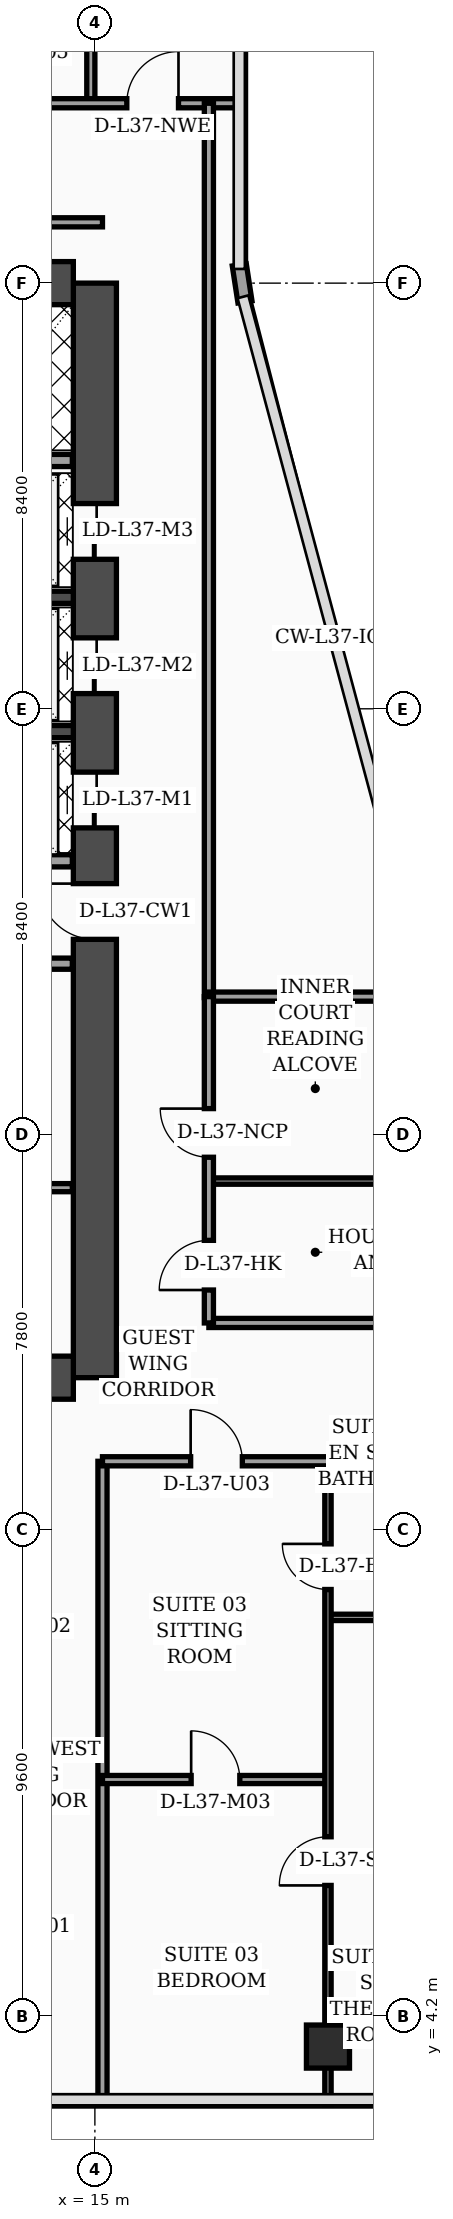
"""IFC4 building model, lengths in metres.
Left out: names, types, materials, properties, quantities, classifications, styles, units other than length and angle.
Written with IfcOpenShell. Run it as: python <this file> out.ifc"""

import sys

from ifc_helpers import new_model, si_unit, direction, frame, frame_2d, origin, origin_2d, place, context, subcontext, project, spatial, rectangle, hollow_rectangle, extrude, element, fill, save


model = new_model("IFC4")
c1 = context("Model", 3, precision=1e-05, world=origin(), true_north=direction((0.0, 1.0)))
c2 = subcontext(c1, "Body", "Model", "MODEL_VIEW")
j1 = project(units=[si_unit("LENGTHUNIT", "METRE"), si_unit("PLANEANGLEUNIT", "RADIAN")], contexts=[c1])
p1 = place(None, origin())
s1 = spatial("IfcSite", under=j1, at=p1, CompositionType="ELEMENT")
p2 = place(p1, origin())
s2 = spatial("IfcBuilding", under=s1, at=p2, CompositionType="ELEMENT")
p3 = place(p2, frame((0.0, 0.0, 152.3)))
s3 = spatial("IfcBuildingStorey", under=s2, at=p3, CompositionType="ELEMENT", Elevation=152.3)
p4 = place(p3, frame((15.0, 16.8, 0.0), z_axis=(0.0, 0.0, 1.0), x_axis=(0.0, 1.0, 0.0)))
e1 = element("IfcWall", 1, at=p4, inside=s3, PredefinedType="SHEAR", context=c2, shape_type="SweptSolid", body=[
    extrude(rectangle(XDim=21.6, YDim=0.85, at=frame_2d((10.8, 0.0))), origin(), (0.0, 0.0, 1.0), 3.56),
])
p5 = place(p4, frame((8.65, 0.0, 0.0)))
e2 = element("IfcOpeningElement", 2, at=p5, cuts=e1, PredefinedType="OPENING", context=c2, shape_type="SweptSolid", body=[
    extrude(rectangle(XDim=1.1, YDim=2.2, at=frame_2d((0.55, 1.1))), frame((0.0, 0.435, 0.0), z_axis=(0.0, -1.0, 0.0), x_axis=(1.0, 0.0, 0.0)), (0.0, 0.0, 1.0), 0.87),
])
p6 = place(p4, frame((10.85, 0.0, 0.0)))
e3 = element("IfcOpeningElement", 3, at=p6, cuts=e1, PredefinedType="OPENING", context=c2, shape_type="SweptSolid", body=[
    extrude(rectangle(XDim=1.1, YDim=2.2, at=frame_2d((0.55, 1.1))), frame((0.0, 0.435, 0.0), z_axis=(0.0, -1.0, 0.0), x_axis=(1.0, 0.0, 0.0)), (0.0, 0.0, 1.0), 0.87),
])
p7 = place(p4, frame((13.5, 0.0, 0.0)))
e4 = element("IfcOpeningElement", 4, at=p7, cuts=e1, PredefinedType="OPENING", context=c2, shape_type="SweptSolid", body=[
    extrude(rectangle(XDim=1.1, YDim=2.2, at=frame_2d((0.55, 1.1))), frame((0.0, 0.435, 0.0), z_axis=(0.0, -1.0, 0.0), x_axis=(1.0, 0.0, 0.0)), (0.0, 0.0, 1.0), 0.87),
])
p8 = place(p4, frame((16.15, 0.0, 0.0)))
e5 = element("IfcOpeningElement", 5, at=p8, cuts=e1, PredefinedType="OPENING", context=c2, shape_type="SweptSolid", body=[
    extrude(rectangle(XDim=1.1, YDim=2.2, at=frame_2d((0.55, 1.1))), frame((0.0, 0.435, 0.0), z_axis=(0.0, -1.0, 0.0), x_axis=(1.0, 0.0, 0.0)), (0.0, 0.0, 1.0), 0.87),
])
for number, where, z_axis, x_axis in (
    (6, (4.625, 38.4, 0.0), (0.0, 0.0, 1.0), (1.0, 0.0, 0.0)),
    (7, (4.625, 16.8, 0.0), (0.0, 0.0, 1.0), (1.0, 0.0, 0.0)),
):
    element("IfcWall", number, at=place(p3, frame(where, z_axis=z_axis, x_axis=x_axis)), inside=s3, PredefinedType="SHEAR", context=c2, shape_type="SweptSolid", body=[
        extrude(rectangle(XDim=9.95, YDim=0.85, at=frame_2d((4.975, 0.0))), origin(), (0.0, 0.0, 1.0), 3.56),
    ])
for number, where, z_axis, x_axis in (
    (8, (12.18, 29.55, 0.0), (0.0, 0.0, 1.0), (1.0, 0.0, 0.0)),
    (9, (12.18, 32.2, 0.0), (0.0, 0.0, 1.0), (1.0, 0.0, 0.0)),
):
    element("IfcWall", number, at=place(p3, frame(where, z_axis=z_axis, x_axis=x_axis)), inside=s3, PredefinedType="SOLIDWALL", context=c2, shape_type="SweptSolid", body=[
        extrude(rectangle(XDim=2.395, YDim=0.24, at=frame_2d((1.198, 0.0))), origin(), (0.0, 0.0, 1.0), 3.56),
    ])
p9 = place(p3, frame((19.6, 3.6, 0.0), z_axis=(0.0, 0.0, 1.0), x_axis=(1.0, 0.0, 0.0)))
e10 = element("IfcColumn", 10, at=p9, inside=s3, PredefinedType="COLUMN", context=c2, shape_type="SweptSolid", body=[
    extrude(hollow_rectangle(XDim=0.85, YDim=0.85, WallThickness=0.036, at=origin_2d()), origin(), (0.0, 0.0, 1.0), 3.56),
])
p10 = place(p3, frame((17.962, 38.03, 0.0), z_axis=(0.0, 0.0, 1.0), x_axis=(-0.15141125477, 0.988470855377, 0.0)))
e11 = element("IfcWall", 11, at=p10, inside=s3, PredefinedType="SOLIDWALL", context=c2, shape_type="SweptSolid", body=[
    extrude(rectangle(XDim=0.739, YDim=0.28, at=frame_2d((0.369, 0.0))), origin(), (0.0, 0.0, 1.0), 3.56),
])
p11 = place(p3, frame((9.68, 20.55, 0.0), z_axis=(0.0, 0.0, 1.0), x_axis=(1.0, 0.0, 0.0)))
e12 = element("IfcWall", 12, at=p11, inside=s3, PredefinedType="PARTITIONING", context=c2, shape_type="SweptSolid", body=[
    extrude(rectangle(XDim=4.875, YDim=0.16, at=frame_2d((2.438, 0.0))), origin(), (0.0, 0.0, 1.0), 3.56),
])
p12 = place(p11, frame((1.1, 0.0, 0.0)))
e13 = element("IfcOpeningElement", 13, at=p12, cuts=e12, PredefinedType="OPENING", context=c2, shape_type="SweptSolid", body=[
    extrude(rectangle(XDim=0.98, YDim=2.15, at=frame_2d((0.49, 1.075))), frame((0.0, 0.09, 0.0), z_axis=(0.0, -1.0, 0.0), x_axis=(1.0, 0.0, 0.0)), (0.0, 0.0, 1.0), 0.18),
])
p13 = place(p3, frame((9.68, 24.97, 0.0), z_axis=(0.0, 0.0, 1.0), x_axis=(1.0, 0.0, 0.0)))
e14 = element("IfcWall", 14, at=p13, inside=s3, PredefinedType="SOLIDWALL", context=c2, shape_type="SweptSolid", body=[
    extrude(rectangle(XDim=4.875, YDim=0.22, at=frame_2d((2.438, 0.0))), origin(), (0.0, 0.0, 1.0), 2.94),
])
p14 = place(p13, frame((0.9, 0.0, 0.0)))
e15 = element("IfcOpeningElement", 15, at=p14, cuts=e14, PredefinedType="OPENING", context=c2, shape_type="SweptSolid", body=[
    extrude(rectangle(XDim=0.98, YDim=2.15, at=frame_2d((0.49, 1.075))), frame((0.0, 0.12, 0.0), z_axis=(0.0, -1.0, 0.0), x_axis=(1.0, 0.0, 0.0)), (0.0, 0.0, 1.0), 0.24),
])
p15 = place(p3, frame((12.25, 27.0, 0.0), z_axis=(0.0, 0.0, 1.0), x_axis=(1.0, 0.0, 0.0)))
e16 = element("IfcWall", 16, at=p15, inside=s3, PredefinedType="SOLIDWALL", context=c2, shape_type="SweptSolid", body=[
    extrude(rectangle(XDim=2.305, YDim=0.24, at=frame_2d((1.152, 0.0))), origin(), (0.0, 0.0, 1.0), 3.56),
])
p16 = place(p3, frame((9.66, 34.9, 0.0), z_axis=(0.0, 0.0, 1.0), x_axis=(1.0, 0.0, 0.0)))
e17 = element("IfcWall", 17, at=p16, inside=s3, PredefinedType="SOLIDWALL", context=c2, shape_type="SweptSolid", body=[
    extrude(rectangle(XDim=4.895, YDim=0.24, at=frame_2d((2.448, 0.0))), origin(), (0.0, 0.0, 1.0), 3.56),
])
p17 = place(p3, frame((15.15, 2.44, 0.0), z_axis=(0.0, 0.0, 1.0), x_axis=(0.0, 1.0, 0.0)))
e18 = element("IfcWall", 18, at=p17, inside=s3, PredefinedType="PARTITIONING", context=c2, shape_type="SweptSolid", body=[
    extrude(rectangle(XDim=12.71, YDim=0.18, at=frame_2d((6.355, 0.0))), origin(), (0.0, 0.0, 1.0), 3.04),
])
p18 = place(p3, frame((19.6, 12.07, 0.0), z_axis=(0.0, 0.0, 1.0), x_axis=(1.0, 0.0, 0.0)))
e19 = element("IfcWall", 19, at=p18, inside=s3, PredefinedType="PARTITIONING", context=c2, shape_type="SweptSolid", body=[
    extrude(rectangle(XDim=2.0, YDim=0.125, at=frame_2d((1.0, 0.0))), origin(), (0.0, 0.0, 1.0), 3.56),
])
p19 = place(p3, frame((15.15, 8.87, 0.0), z_axis=(0.0, 0.0, 1.0), x_axis=(1.0, 0.0, 0.0)))
e20 = element("IfcWall", 20, at=p19, inside=s3, PredefinedType="PARTITIONING", context=c2, shape_type="SweptSolid", body=[
    extrude(rectangle(XDim=4.45, YDim=0.16, at=frame_2d((2.225, 0.0))), origin(), (0.0, 0.0, 1.0), 3.56),
])
p20 = place(p19, frame((1.75, 0.0, 0.0)))
e21 = element("IfcOpeningElement", 21, at=p20, cuts=e20, PredefinedType="OPENING", context=c2, shape_type="SweptSolid", body=[
    extrude(rectangle(XDim=0.96, YDim=2.2, at=frame_2d((0.48, 1.1))), frame((0.0, 0.09, 0.0), z_axis=(0.0, -1.0, 0.0), x_axis=(1.0, 0.0, 0.0)), (0.0, 0.0, 1.0), 0.18),
])
p21 = place(p3, frame((19.6, 2.44, 0.0), z_axis=(0.0, 0.0, 1.0), x_axis=(0.0, 1.0, 0.0)))
e22 = element("IfcWall", 22, at=p21, inside=s3, PredefinedType="PARTITIONING", context=c2, shape_type="SweptSolid", body=[
    extrude(rectangle(XDim=12.71, YDim=0.125, at=frame_2d((6.355, 0.0))), origin(), (0.0, 0.0, 1.0), 2.49),
])
p22 = place(p21, frame((4.34, 0.0, 0.0)))
e23 = element("IfcOpeningElement", 23, at=p22, cuts=e22, PredefinedType="OPENING", context=c2, shape_type="SweptSolid", body=[
    extrude(rectangle(XDim=0.96, YDim=2.2, at=frame_2d((0.48, 1.1))), frame((0.0, 0.073, 0.0), z_axis=(0.0, -1.0, 0.0), x_axis=(1.0, 0.0, 0.0)), (0.0, 0.0, 1.0), 0.145),
])
p23 = place(p21, frame((10.18, 0.0, 0.0)))
e24 = element("IfcOpeningElement", 24, at=p23, cuts=e22, PredefinedType="OPENING", context=c2, shape_type="SweptSolid", body=[
    extrude(rectangle(XDim=0.9, YDim=2.15, at=frame_2d((0.45, 1.075))), frame((0.0, 0.073, 0.0), z_axis=(0.0, -1.0, 0.0), x_axis=(1.0, 0.0, 0.0)), (0.0, 0.0, 1.0), 0.145),
])
p24 = place(p3, frame((15.15, 15.15, 0.0), z_axis=(0.0, 0.0, 1.0), x_axis=(1.0, 0.0, 0.0)))
e25 = element("IfcWall", 25, at=p24, inside=s3, PredefinedType="PARTITIONING", context=c2, shape_type="SweptSolid", body=[
    extrude(rectangle(XDim=6.45, YDim=0.18, at=frame_2d((3.225, 0.0))), origin(), (0.0, 0.0, 1.0), 2.49),
])
p25 = place(p24, frame((1.74, 0.0, 0.0)))
e26 = element("IfcOpeningElement", 26, at=p25, cuts=e25, PredefinedType="OPENING", context=c2, shape_type="SweptSolid", body=[
    extrude(rectangle(XDim=1.02, YDim=2.2, at=frame_2d((0.51, 1.1))), frame((0.0, 0.1, 0.0), z_axis=(0.0, -1.0, 0.0), x_axis=(1.0, 0.0, 0.0)), (0.0, 0.0, 1.0), 0.2),
])
p26 = place(p3, frame((14.92, 41.95, 0.0), z_axis=(0.0, 0.0, 1.0), x_axis=(0.0, 1.0, 0.0)))
e27 = element("IfcWall", 27, at=p26, inside=s3, PredefinedType="PARTITIONING", context=c2, shape_type="SweptSolid", body=[
    extrude(rectangle(XDim=5.85, YDim=0.16, at=frame_2d((2.925, 0.0))), origin(), (0.0, 0.0, 1.0), 3.04),
])
p27 = place(p3, frame((0.08, 41.95, 0.0), z_axis=(0.0, 0.0, 1.0), x_axis=(1.0, 0.0, 0.0)))
e28 = element("IfcWall", 28, at=p27, inside=s3, PredefinedType="PARTITIONING", context=c2, shape_type="SweptSolid", body=[
    extrude(rectangle(XDim=17.77, YDim=0.18, at=frame_2d((8.885, 0.0))), origin(), (0.0, 0.0, 1.0), 2.94),
])
p28 = place(p27, frame((0.9, 0.0, 0.0)))
e29 = element("IfcOpeningElement", 29, at=p28, cuts=e28, PredefinedType="OPENING", context=c2, shape_type="SweptSolid", body=[
    extrude(rectangle(XDim=1.02, YDim=2.2, at=frame_2d((0.51, 1.1))), frame((0.0, 0.1, 0.0), z_axis=(0.0, -1.0, 0.0), x_axis=(1.0, 0.0, 0.0)), (0.0, 0.0, 1.0), 0.2),
])
p29 = place(p27, frame((4.45, 0.0, 0.0)))
e30 = element("IfcOpeningElement", 30, at=p29, cuts=e28, PredefinedType="OPENING", context=c2, shape_type="SweptSolid", body=[
    extrude(rectangle(XDim=1.02, YDim=2.2, at=frame_2d((0.51, 1.1))), frame((0.0, 0.1, 0.0), z_axis=(0.0, -1.0, 0.0), x_axis=(1.0, 0.0, 0.0)), (0.0, 0.0, 1.0), 0.2),
])
p30 = place(p27, frame((10.33, 0.0, 0.0)))
e31 = element("IfcOpeningElement", 31, at=p30, cuts=e28, PredefinedType="OPENING", context=c2, shape_type="SweptSolid", body=[
    extrude(rectangle(XDim=1.02, YDim=2.2, at=frame_2d((0.51, 1.1))), frame((0.0, 0.1, 0.0), z_axis=(0.0, -1.0, 0.0), x_axis=(1.0, 0.0, 0.0)), (0.0, 0.0, 1.0), 0.2),
])
p31 = place(p27, frame((15.55, 0.0, 0.0)))
e32 = element("IfcOpeningElement", 32, at=p31, cuts=e28, PredefinedType="OPENING", context=c2, shape_type="SweptSolid", body=[
    extrude(rectangle(XDim=1.02, YDim=2.2, at=frame_2d((0.51, 1.1))), frame((0.0, 0.1, 0.0), z_axis=(0.0, -1.0, 0.0), x_axis=(1.0, 0.0, 0.0)), (0.0, 0.0, 1.0), 0.2),
])
p32 = place(p3, frame((17.25, 24.3, 0.0), z_axis=(0.0, 0.0, 1.0), x_axis=(0.0, 1.0, 0.0)))
e33 = element("IfcWall", 33, at=p32, inside=s3, PredefinedType="PARTITIONING", context=c2, shape_type="SweptSolid", body=[
    extrude(rectangle(XDim=17.65, YDim=0.18, at=frame_2d((8.825, 0.0))), origin(), (0.0, 0.0, 1.0), 2.94),
])
p33 = place(p3, frame((3.755, 39.6, 0.0), z_axis=(0.0, 0.0, 1.0), x_axis=(1.0, 0.0, 0.0)))
e34 = element("IfcWall", 34, at=p33, inside=s3, PredefinedType="PARTITIONING", context=c2, shape_type="SweptSolid", body=[
    extrude(rectangle(XDim=11.395, YDim=0.18, at=frame_2d((5.698, 0.0))), origin(), (0.0, 0.0, 1.0), 2.94),
])
p34 = place(p3, frame((17.25, 17.88, 0.0), z_axis=(0.0, 0.0, 1.0), x_axis=(1.0, 0.0, 0.0)))
e35 = element("IfcWall", 35, at=p34, inside=s3, PredefinedType="PARTITIONING", context=c2, shape_type="SweptSolid", body=[
    extrude(rectangle(XDim=4.3, YDim=0.18, at=frame_2d((2.15, 0.0))), origin(), (0.0, 0.0, 1.0), 3.09),
])
p35 = place(p3, frame((17.25, 20.68, 0.0), z_axis=(0.0, 0.0, 1.0), x_axis=(1.0, 0.0, 0.0)))
e36 = element("IfcWall", 36, at=p35, inside=s3, PredefinedType="PARTITIONING", context=c2, shape_type="SweptSolid", body=[
    extrude(rectangle(XDim=4.3, YDim=0.125, at=frame_2d((2.15, 0.0))), origin(), (0.0, 0.0, 1.0), 3.56),
])
p36 = place(p3, frame((17.25, 24.32, 0.0), z_axis=(0.0, 0.0, 1.0), x_axis=(1.0, 0.0, 0.0)))
e37 = element("IfcWall", 37, at=p36, inside=s3, PredefinedType="PARTITIONING", context=c2, shape_type="SweptSolid", body=[
    extrude(rectangle(XDim=4.35, YDim=0.18, at=frame_2d((2.175, 0.0))), origin(), (0.0, 0.0, 1.0), 3.56),
])
p37 = place(p3, frame((17.25, 17.88, 0.0), z_axis=(0.0, 0.0, 1.0), x_axis=(0.0, 1.0, 0.0)))
e38 = element("IfcWall", 38, at=p37, inside=s3, PredefinedType="PARTITIONING", context=c2, shape_type="SweptSolid", body=[
    extrude(rectangle(XDim=6.44, YDim=0.18, at=frame_2d((3.22, 0.0))), origin(), (0.0, 0.0, 1.0), 3.09),
])
p38 = place(p37, frame((0.65, 0.0, 0.0)))
e39 = element("IfcOpeningElement", 39, at=p38, cuts=e38, PredefinedType="OPENING", context=c2, shape_type="SweptSolid", body=[
    extrude(rectangle(XDim=0.98, YDim=2.15, at=frame_2d((0.49, 1.075))), frame((0.0, 0.1, 0.0), z_axis=(0.0, -1.0, 0.0), x_axis=(1.0, 0.0, 0.0)), (0.0, 0.0, 1.0), 0.2),
])
p39 = place(p37, frame((3.27, 0.0, 0.0)))
e40 = element("IfcOpeningElement", 40, at=p39, cuts=e38, PredefinedType="OPENING", context=c2, shape_type="SweptSolid", body=[
    extrude(rectangle(XDim=0.96, YDim=2.2, at=frame_2d((0.48, 1.1))), frame((0.0, 0.1, 0.0), z_axis=(0.0, -1.0, 0.0), x_axis=(1.0, 0.0, 0.0)), (0.0, 0.0, 1.0), 0.2),
])
p40 = place(p20, origin())
e41 = element("IfcDoor", 41, at=p40, inside=s3, OperationType="SINGLE_SWING_LEFT", PredefinedType="DOOR", context=c2, shape_type="SweptSolid", body=[
    extrude(rectangle(XDim=0.96, YDim=2.2, at=frame_2d((0.48, 1.1))), frame((0.0, 0.025, 0.0), z_axis=(0.0, -1.0, 0.0), x_axis=(1.0, 0.0, 0.0)), (0.0, 0.0, 1.0), 0.05),
])
fill(e21, e41)
p41 = place(p22, origin())
e42 = element("IfcDoor", 42, at=p41, inside=s3, OperationType="SINGLE_SWING_LEFT", PredefinedType="DOOR", context=c2, shape_type="SweptSolid", body=[
    extrude(rectangle(XDim=0.96, YDim=2.2, at=frame_2d((0.48, 1.1))), frame((0.0, 0.025, 0.0), z_axis=(0.0, -1.0, 0.0), x_axis=(1.0, 0.0, 0.0)), (0.0, 0.0, 1.0), 0.05),
])
fill(e23, e42)
p42 = place(p23, origin())
e43 = element("IfcDoor", 43, at=p42, inside=s3, OperationType="SINGLE_SWING_RIGHT", PredefinedType="DOOR", context=c2, shape_type="SweptSolid", body=[
    extrude(rectangle(XDim=0.9, YDim=2.15, at=frame_2d((0.45, 1.075))), frame((0.0, 0.025, 0.0), z_axis=(0.0, -1.0, 0.0), x_axis=(1.0, 0.0, 0.0)), (0.0, 0.0, 1.0), 0.05),
])
fill(e24, e43)
p43 = place(p25, origin())
e44 = element("IfcDoor", 44, at=p43, inside=s3, OperationType="SINGLE_SWING_LEFT", PredefinedType="DOOR", context=c2, shape_type="SweptSolid", body=[
    extrude(rectangle(XDim=1.02, YDim=2.2, at=frame_2d((0.51, 1.1))), frame((0.0, 0.025, 0.0), z_axis=(0.0, -1.0, 0.0), x_axis=(1.0, 0.0, 0.0)), (0.0, 0.0, 1.0), 0.05),
])
fill(e26, e44)
p44 = place(p31, origin())
e45 = element("IfcDoor", 45, at=p44, inside=s3, OperationType="SINGLE_SWING_RIGHT", PredefinedType="DOOR", context=c2, shape_type="SweptSolid", body=[
    extrude(rectangle(XDim=1.02, YDim=2.2, at=frame_2d((0.51, 1.1))), frame((0.0, 0.025, 0.0), z_axis=(0.0, -1.0, 0.0), x_axis=(1.0, 0.0, 0.0)), (0.0, 0.0, 1.0), 0.05),
])
fill(e32, e45)
p45 = place(p38, origin())
e46 = element("IfcDoor", 46, at=p45, inside=s3, OperationType="SINGLE_SWING_LEFT", PredefinedType="DOOR", context=c2, shape_type="SweptSolid", body=[
    extrude(rectangle(XDim=0.98, YDim=2.15, at=frame_2d((0.49, 1.075))), frame((0.0, 0.025, 0.0), z_axis=(0.0, -1.0, 0.0), x_axis=(1.0, 0.0, 0.0)), (0.0, 0.0, 1.0), 0.05),
])
fill(e39, e46)
p46 = place(p39, origin())
e47 = element("IfcDoor", 47, at=p46, inside=s3, OperationType="SINGLE_SWING_RIGHT", PredefinedType="DOOR", context=c2, shape_type="SweptSolid", body=[
    extrude(rectangle(XDim=0.96, YDim=2.2, at=frame_2d((0.48, 1.1))), frame((0.0, 0.025, 0.0), z_axis=(0.0, -1.0, 0.0), x_axis=(1.0, 0.0, 0.0)), (0.0, 0.0, 1.0), 0.05),
])
fill(e40, e47)
p47 = place(p5, origin())
e48 = element("IfcDoor", 48, at=p47, inside=s3, OperationType="SINGLE_SWING_RIGHT", PredefinedType="DOOR", context=c2, shape_type="SweptSolid", body=[
    extrude(rectangle(XDim=1.1, YDim=2.2, at=frame_2d((0.55, 1.1))), frame((0.0, 0.025, 0.0), z_axis=(0.0, -1.0, 0.0), x_axis=(1.0, 0.0, 0.0)), (0.0, 0.0, 1.0), 0.05),
])
fill(e2, e48)
p48 = place(p6, origin())
e49 = element("IfcDoor", 49, at=p48, inside=s3, OperationType="DOUBLE_DOOR_SLIDING", PredefinedType="DOOR", context=c2, shape_type="SweptSolid", body=[
    extrude(rectangle(XDim=1.1, YDim=2.2, at=frame_2d((0.55, 1.1))), frame((0.0, 0.025, 0.0), z_axis=(0.0, -1.0, 0.0), x_axis=(1.0, 0.0, 0.0)), (0.0, 0.0, 1.0), 0.05),
])
fill(e3, e49)
p49 = place(p7, origin())
e50 = element("IfcDoor", 50, at=p49, inside=s3, OperationType="DOUBLE_DOOR_SLIDING", PredefinedType="DOOR", context=c2, shape_type="SweptSolid", body=[
    extrude(rectangle(XDim=1.1, YDim=2.2, at=frame_2d((0.55, 1.1))), frame((0.0, 0.025, 0.0), z_axis=(0.0, -1.0, 0.0), x_axis=(1.0, 0.0, 0.0)), (0.0, 0.0, 1.0), 0.05),
])
fill(e4, e50)
p50 = place(p8, origin())
e51 = element("IfcDoor", 51, at=p50, inside=s3, OperationType="DOUBLE_DOOR_SLIDING", PredefinedType="DOOR", context=c2, shape_type="SweptSolid", body=[
    extrude(rectangle(XDim=1.1, YDim=2.2, at=frame_2d((0.55, 1.1))), frame((0.0, 0.025, 0.0), z_axis=(0.0, -1.0, 0.0), x_axis=(1.0, 0.0, 0.0)), (0.0, 0.0, 1.0), 0.05),
])
fill(e5, e51)
save(model, sys.argv[1])
